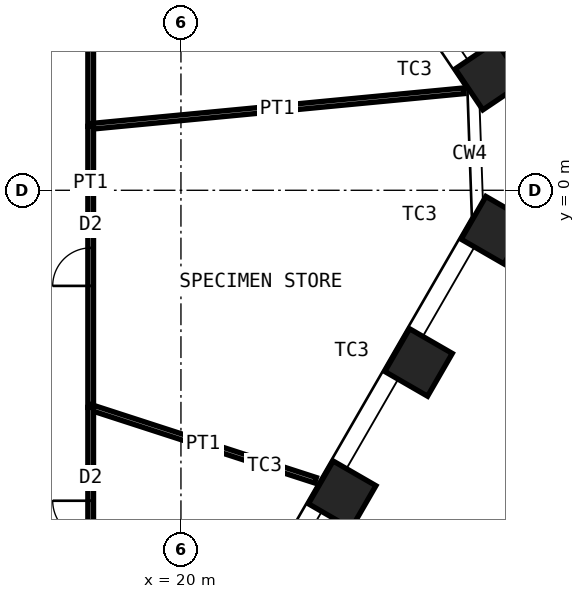
"""IFC4 building model, lengths in metres.
Left out: names, types, materials, properties, quantities, classifications, styles, units other than length and angle.
Written with IfcOpenShell. Run it as: python <this file> out.ifc"""

import sys

from ifc_helpers import new_model, si_unit, direction, frame, frame_2d, origin, origin_2d, place, context, subcontext, project, spatial, rectangle, hollow_rectangle, extrude, element, fill, save


model = new_model("IFC4")
c1 = context("Model", 3, precision=1e-05, world=origin(), true_north=direction((0.0, 1.0)))
c2 = subcontext(c1, "Body", "Model", "MODEL_VIEW")
j1 = project(units=[si_unit("LENGTHUNIT", "METRE"), si_unit("PLANEANGLEUNIT", "RADIAN")], contexts=[c1])
p1 = place(None, origin())
s1 = spatial("IfcSite", under=j1, at=p1, CompositionType="ELEMENT")
p2 = place(p1, origin())
s2 = spatial("IfcBuilding", under=s1, at=p2, CompositionType="ELEMENT")
p3 = place(p2, frame((0.0, 0.0, 124.0)))
s3 = spatial("IfcBuildingStorey", under=s2, at=p3, CompositionType="ELEMENT", Elevation=124.0)
for number, where, z_axis, x_axis in (
    (1, (28.119, 3.019, 0.0), (0.0, 0.0, 1.0), (-0.559, 0.829, 0.0)),
    (2, (28.261, -1.05, 0.0), (0.0, 0.0, 1.0), (0.5, 0.866, 0.0)),
    (3, (26.252, -4.53, 0.0), (0.0, 0.0, 1.0), (0.5, 0.866, 0.0)),
    (4, (24.242, -8.011, 0.0), (0.0, 0.0, 1.0), (0.5, 0.866, 0.0)),
):
    element("IfcColumn", number, at=place(p3, frame(where, z_axis=z_axis, x_axis=x_axis)), inside=s3, PredefinedType="COLUMN", context=c2, shape_type="SweptSolid", body=[
        extrude(hollow_rectangle(XDim=1.3, YDim=1.3, WallThickness=0.1, at=origin_2d()), origin(), (0.0, 0.0, 1.0), 4.2),
    ])
p4 = place(p3, frame((17.625, 7.106, 0.0), z_axis=(0.0, 0.0, 1.0), x_axis=(0.0, -1.0, 0.0)))
e5 = element("IfcWall", 5, at=p4, inside=s3, PredefinedType="PARTITIONING", context=c2, shape_type="SweptSolid", body=[
    extrude(rectangle(XDim=5.425, YDim=0.15, at=frame_2d((2.712, 0.0))), origin(), (0.0, 0.0, 1.0), 4.03),
])
p5 = place(p4, frame((2.212, 0.0, 0.0)))
e6 = element("IfcOpeningElement", 6, at=p5, cuts=e5, PredefinedType="OPENING", context=c2, shape_type="SweptSolid", body=[
    extrude(rectangle(XDim=1.0, YDim=2.4, at=frame_2d((0.5, 1.2))), frame((0.0, 0.085, 0.0), z_axis=(0.0, -1.0, 0.0), x_axis=(1.0, 0.0, 0.0)), (0.0, 0.0, 1.0), 0.17),
])
p6 = place(p3, frame((27.439, 2.618, 0.0), z_axis=(0.0, 0.0, 1.0), x_axis=(-0.995480435234, -0.094966852466, 0.0)))
e7 = element("IfcWall", 7, at=p6, inside=s3, PredefinedType="PARTITIONING", context=c2, shape_type="SweptSolid", body=[
    extrude(rectangle(XDim=9.859, YDim=0.15, at=frame_2d((4.93, 0.0))), origin(), (0.0, 0.0, 1.0), 2.93),
])
p7 = place(p3, frame((17.625, 1.681, 0.0), z_axis=(0.0, 0.0, 1.0), x_axis=(0.0, -1.0, 0.0)))
e8 = element("IfcWall", 8, at=p7, inside=s3, PredefinedType="PARTITIONING", context=c2, shape_type="SweptSolid", body=[
    extrude(rectangle(XDim=7.394, YDim=0.15, at=frame_2d((3.697, 0.0))), origin(), (0.0, 0.0, 1.0), 4.03),
])
p8 = place(p7, frame((3.197, 0.0, 0.0)))
e9 = element("IfcOpeningElement", 9, at=p8, cuts=e8, PredefinedType="OPENING", context=c2, shape_type="SweptSolid", body=[
    extrude(rectangle(XDim=1.0, YDim=2.4, at=frame_2d((0.5, 1.2))), frame((0.0, 0.085, 0.0), z_axis=(0.0, -1.0, 0.0), x_axis=(1.0, 0.0, 0.0)), (0.0, 0.0, 1.0), 0.17),
])
p9 = place(p3, frame((23.541, -7.63, 0.0), z_axis=(0.0, 0.0, 1.0), x_axis=(-0.951280715006, 0.308326128081, 0.0)))
e10 = element("IfcWall", 10, at=p9, inside=s3, PredefinedType="PARTITIONING", context=c2, shape_type="SweptSolid", body=[
    extrude(rectangle(XDim=6.219, YDim=0.15, at=frame_2d((3.109, 0.0))), origin(), (0.0, 0.0, 1.0), 3.33),
])
p10 = place(p3, frame((17.625, -5.713, 0.0), z_axis=(0.0, 0.0, 1.0), x_axis=(0.0, -1.0, 0.0)))
e11 = element("IfcWall", 11, at=p10, inside=s3, PredefinedType="PARTITIONING", context=c2, shape_type="SweptSolid", body=[
    extrude(rectangle(XDim=5.912, YDim=0.15, at=frame_2d((2.956, 0.0))), origin(), (0.0, 0.0, 1.0), 4.03),
])
p11 = place(p10, frame((2.456, 0.0, 0.0)))
e12 = element("IfcOpeningElement", 12, at=p11, cuts=e11, PredefinedType="OPENING", context=c2, shape_type="SweptSolid", body=[
    extrude(rectangle(XDim=1.0, YDim=2.4, at=frame_2d((0.5, 1.2))), frame((0.0, 0.085, 0.0), z_axis=(0.0, -1.0, 0.0), x_axis=(1.0, 0.0, 0.0)), (0.0, 0.0, 1.0), 0.17),
])
p12 = place(p8, origin())
e13 = element("IfcDoor", 13, at=p12, inside=s3, OperationType="SINGLE_SWING_RIGHT", PredefinedType="DOOR", context=c2, shape_type="SweptSolid", body=[
    extrude(rectangle(XDim=1.0, YDim=2.4, at=frame_2d((0.5, 1.2))), frame((0.0, 0.025, 0.0), z_axis=(0.0, -1.0, 0.0), x_axis=(1.0, 0.0, 0.0)), (0.0, 0.0, 1.0), 0.05),
])
fill(e9, e13)
p13 = place(p11, origin())
e14 = element("IfcDoor", 14, at=p13, inside=s3, OperationType="SINGLE_SWING_LEFT", PredefinedType="DOOR", context=c2, shape_type="SweptSolid", body=[
    extrude(rectangle(XDim=1.0, YDim=2.4, at=frame_2d((0.5, 1.2))), frame((0.0, 0.025, 0.0), z_axis=(0.0, -1.0, 0.0), x_axis=(1.0, 0.0, 0.0)), (0.0, 0.0, 1.0), 0.05),
])
fill(e12, e14)
save(model, sys.argv[1])
